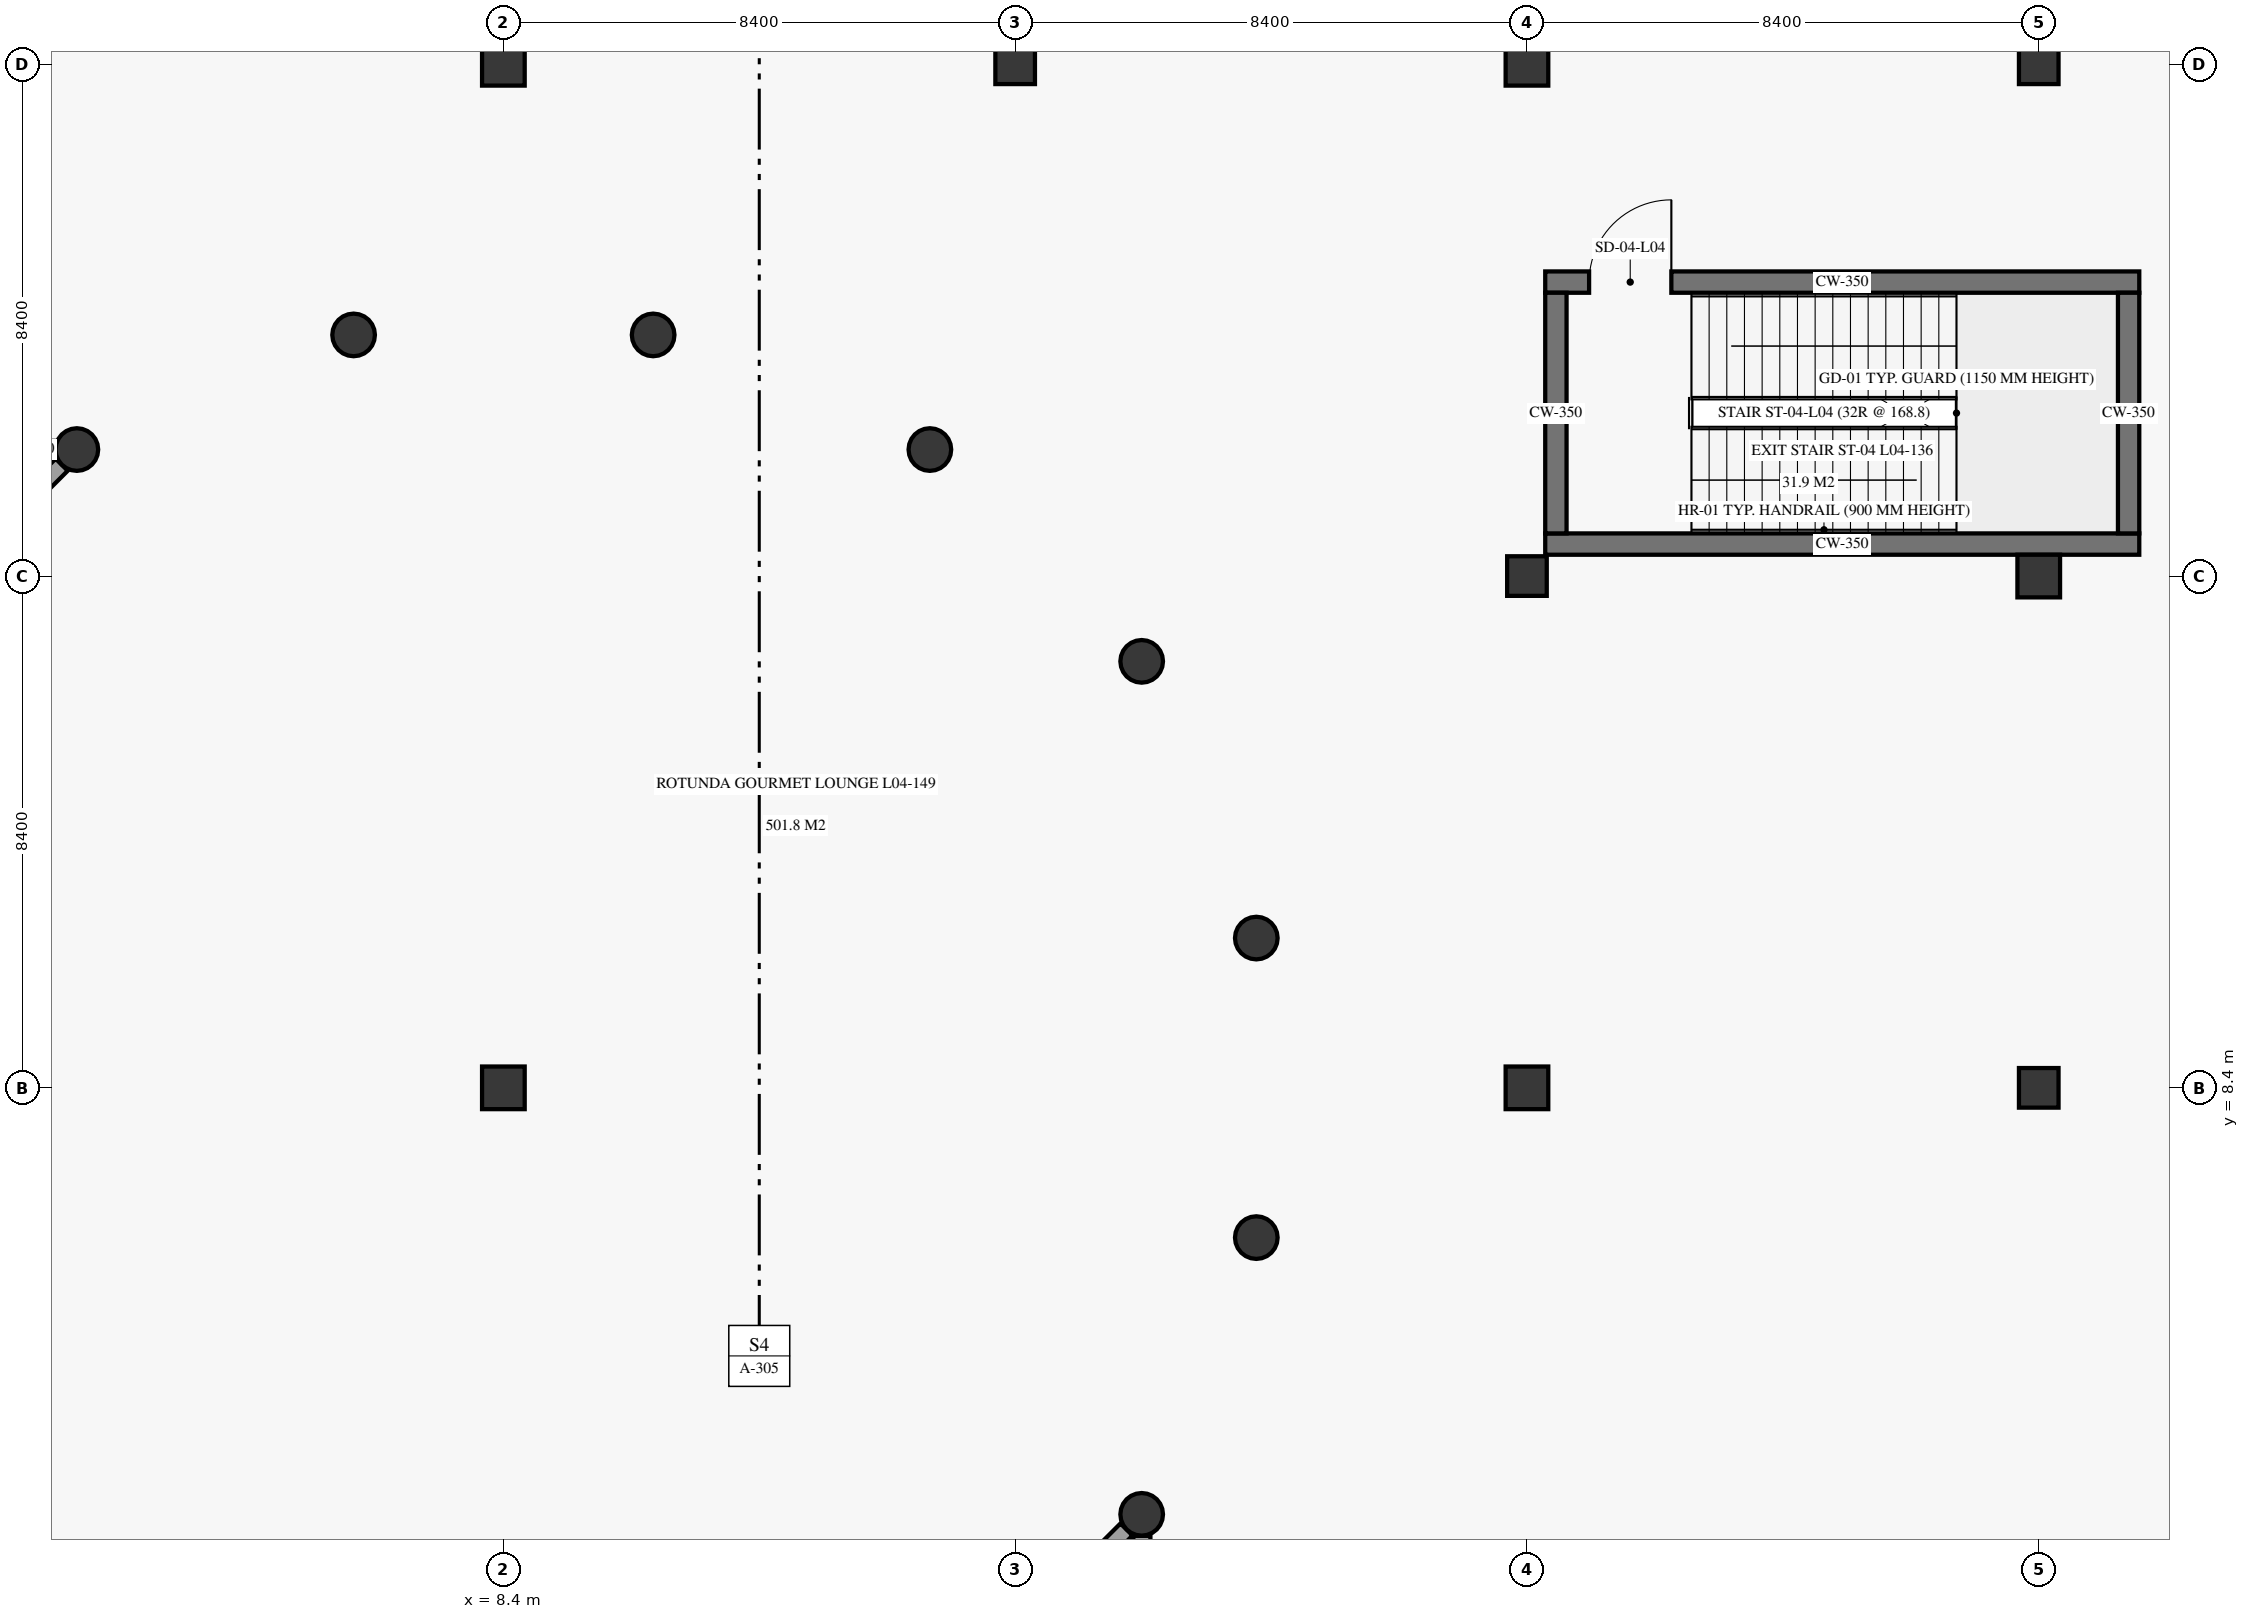
"""IFC4 building model, lengths in metres.
Left out: names, types, materials, properties, quantities, classifications, styles, units other than length and angle.
Written with IfcOpenShell. Run it as: python <this file> out.ifc"""

import sys

from ifc_helpers import new_model, si_unit, direction, frame, frame_2d, origin, origin_2d, place, context, subcontext, project, spatial, rectangle, circle, extrude, element, fill, save


model = new_model("IFC4")
c1 = context("Model", 3, precision=1e-05, world=origin(), true_north=direction((0.0, 1.0)))
c2 = subcontext(c1, "Body", "Model", "MODEL_VIEW")
j1 = project(units=[si_unit("LENGTHUNIT", "METRE"), si_unit("PLANEANGLEUNIT", "RADIAN")], contexts=[c1])
p1 = place(None, origin())
s1 = spatial("IfcSite", under=j1, at=p1, CompositionType="ELEMENT")
p2 = place(p1, origin())
s2 = spatial("IfcBuilding", under=s1, at=p2, CompositionType="ELEMENT")
p3 = place(p2, frame((0.0, 0.0, 16.8)))
s3 = spatial("IfcBuildingStorey", under=s2, at=p3, CompositionType="ELEMENT", Elevation=16.8)
for number, where, z_axis, x_axis in (
    (1, (8.4, 8.4, 0.0), (0.0, 0.0, 1.0), (1.0, 0.0, 0.0)),
    (2, (8.4, 25.2, 0.0), (0.0, 0.0, 1.0), (1.0, 0.0, 0.0)),
):
    element("IfcColumn", number, at=place(p3, frame(where, z_axis=z_axis, x_axis=x_axis)), inside=s3, PredefinedType="COLUMN", context=c2, shape_type="SweptSolid", body=[
        extrude(rectangle(XDim=0.7, YDim=0.7, at=origin_2d()), origin(), (0.0, 0.0, 1.0), 5.1),
    ])
p4 = place(p3, frame((16.8, 25.2, 0.0), z_axis=(0.0, 0.0, 1.0), x_axis=(1.0, 0.0, 0.0)))
e3 = element("IfcColumn", 3, at=p4, inside=s3, PredefinedType="COLUMN", context=c2, shape_type="SweptSolid", body=[
    extrude(rectangle(XDim=0.65, YDim=0.65, at=origin_2d()), origin(), (0.0, 0.0, 1.0), 5.1),
])
p5 = place(p3, frame((25.2, 8.4, 0.0), z_axis=(0.0, 0.0, 1.0), x_axis=(1.0, 0.0, 0.0)))
e4 = element("IfcColumn", 4, at=p5, inside=s3, PredefinedType="COLUMN", context=c2, shape_type="SweptSolid", body=[
    extrude(rectangle(XDim=0.7, YDim=0.7, at=origin_2d()), origin(), (0.0, 0.0, 1.0), 5.1),
])
p6 = place(p3, frame((25.2, 16.8, 0.0), z_axis=(0.0, 0.0, 1.0), x_axis=(1.0, 0.0, 0.0)))
e5 = element("IfcColumn", 5, at=p6, inside=s3, PredefinedType="COLUMN", context=c2, shape_type="SweptSolid", body=[
    extrude(rectangle(XDim=0.65, YDim=0.65, at=origin_2d()), origin(), (0.0, 0.0, 1.0), 5.1),
])
p7 = place(p3, frame((25.2, 25.2, 0.0), z_axis=(0.0, 0.0, 1.0), x_axis=(1.0, 0.0, 0.0)))
e6 = element("IfcColumn", 6, at=p7, inside=s3, PredefinedType="COLUMN", context=c2, shape_type="SweptSolid", body=[
    extrude(rectangle(XDim=0.7, YDim=0.7, at=origin_2d()), origin(), (0.0, 0.0, 1.0), 5.1),
])
p8 = place(p3, frame((33.6, 8.4, 0.0), z_axis=(0.0, 0.0, 1.0), x_axis=(1.0, 0.0, 0.0)))
e7 = element("IfcColumn", 7, at=p8, inside=s3, PredefinedType="COLUMN", context=c2, shape_type="SweptSolid", body=[
    extrude(rectangle(XDim=0.65, YDim=0.65, at=origin_2d()), origin(), (0.0, 0.0, 1.0), 5.1),
])
p9 = place(p3, frame((33.6, 16.8, 0.0), z_axis=(0.0, 0.0, 1.0), x_axis=(1.0, 0.0, 0.0)))
e8 = element("IfcColumn", 8, at=p9, inside=s3, PredefinedType="COLUMN", context=c2, shape_type="SweptSolid", body=[
    extrude(rectangle(XDim=0.7, YDim=0.7, at=origin_2d()), origin(), (0.0, 0.0, 1.0), 5.1),
])
p10 = place(p3, frame((33.6, 25.2, 0.0), z_axis=(0.0, 0.0, 1.0), x_axis=(1.0, 0.0, 0.0)))
e9 = element("IfcColumn", 9, at=p10, inside=s3, PredefinedType="COLUMN", context=c2, shape_type="SweptSolid", body=[
    extrude(rectangle(XDim=0.65, YDim=0.65, at=origin_2d()), origin(), (0.0, 0.0, 1.0), 5.1),
])
for number, where, z_axis, x_axis in (
    (10, (20.758, 10.858, 0.0), (0.0, 0.0, 1.0), (1.0, 0.0, 0.0)),
    (11, (18.876, 15.4, 0.0), (0.0, 0.0, 1.0), (1.0, 0.0, 0.0)),
    (12, (15.4, 18.876, 0.0), (0.0, 0.0, 1.0), (1.0, 0.0, 0.0)),
    (13, (10.858, 20.758, 0.0), (0.0, 0.0, 1.0), (1.0, 0.0, 0.0)),
    (14, (5.942, 20.758, 0.0), (0.0, 0.0, 1.0), (1.0, 0.0, 0.0)),
    (15, (1.4, 18.876, 0.0), (0.0, 0.0, 1.0), (1.0, 0.0, 0.0)),
    (16, (18.876, 1.4, 0.0), (0.0, 0.0, 1.0), (1.0, 0.0, 0.0)),
    (17, (20.758, 5.942, 0.0), (0.0, 0.0, 1.0), (1.0, 0.0, 0.0)),
):
    element("IfcColumn", number, at=place(p3, frame(where, z_axis=z_axis, x_axis=x_axis)), inside=s3, PredefinedType="COLUMN", context=c2, shape_type="SweptSolid", body=[
        extrude(circle(Radius=0.35, at=origin_2d()), origin(), (0.0, 0.0, 1.0), 5.1),
    ])
p11 = place(p3, frame((1.151, 18.628, 0.0), z_axis=(0.0, 0.0, 1.0), x_axis=(-0.707106781187, -0.707106781187, 0.0)))
e18 = element("IfcWall", 18, at=p11, inside=s3, PredefinedType="SOLIDWALL", context=c2, shape_type="SweptSolid", body=[
    extrude(rectangle(XDim=4.212, YDim=0.28, at=frame_2d((2.106, 0.0))), origin(), (0.0, 0.0, 1.0), 4.38),
])
p12 = place(p11, frame((1.018, 0.0, 1.05)))
e19 = element("IfcOpeningElement", 19, at=p12, cuts=e18, PredefinedType="OPENING", context=c2, shape_type="SweptSolid", body=[
    extrude(rectangle(XDim=1.95, YDim=1.85, at=frame_2d((0.975, 0.925))), frame((0.0, 0.15, 0.0), z_axis=(0.0, -1.0, 0.0), x_axis=(1.0, 0.0, 0.0)), (0.0, 0.0, 1.0), 0.3),
])
p13 = place(p3, frame((-1.828, 1.151, 0.0), z_axis=(0.0, 0.0, 1.0), x_axis=(0.707106781187, -0.707106781187, 0.0)))
e20 = element("IfcWall", 20, at=p13, inside=s3, PredefinedType="SOLIDWALL", context=c2, shape_type="SweptSolid", body=[
    extrude(rectangle(XDim=4.212, YDim=0.28, at=frame_2d((2.106, 0.0))), origin(), (0.0, 0.0, 1.0), 4.38),
])
p14 = place(p13, frame((1.018, 0.0, 1.05)))
e21 = element("IfcOpeningElement", 21, at=p14, cuts=e20, PredefinedType="OPENING", context=c2, shape_type="SweptSolid", body=[
    extrude(rectangle(XDim=1.95, YDim=1.85, at=frame_2d((0.975, 0.925))), frame((0.0, 0.15, 0.0), z_axis=(0.0, -1.0, 0.0), x_axis=(1.0, 0.0, 0.0)), (0.0, 0.0, 1.0), 0.3),
])
p15 = place(p3, frame((15.649, -1.828, 0.0), z_axis=(0.0, 0.0, 1.0), x_axis=(0.707106781187, 0.707106781187, 0.0)))
e22 = element("IfcWall", 22, at=p15, inside=s3, PredefinedType="SOLIDWALL", context=c2, shape_type="SweptSolid", body=[
    extrude(rectangle(XDim=4.212, YDim=0.28, at=frame_2d((2.106, 0.0))), origin(), (0.0, 0.0, 1.0), 4.38),
])
p16 = place(p15, frame((1.018, 0.0, 1.05)))
e23 = element("IfcOpeningElement", 23, at=p16, cuts=e22, PredefinedType="OPENING", context=c2, shape_type="SweptSolid", body=[
    extrude(rectangle(XDim=1.95, YDim=1.85, at=frame_2d((0.975, 0.925))), frame((0.0, 0.15, 0.0), z_axis=(0.0, -1.0, 0.0), x_axis=(1.0, 0.0, 0.0)), (0.0, 0.0, 1.0), 0.3),
])
for number, where, z_axis, x_axis in (
    (24, (0.15, 18.88, 0.0), (0.0, 0.0, 1.0), (1.0, 0.0, 0.0)),
    (25, (18.88, 0.15, 0.0), (0.0, 0.0, 1.0), (0.0, 1.0, 0.0)),
):
    element("IfcWall", number, at=place(p3, frame(where, z_axis=z_axis, x_axis=x_axis)), inside=s3, PredefinedType="SOLIDWALL", context=c2, shape_type="SweptSolid", body=[
        extrude(rectangle(XDim=0.896, YDim=0.28, at=frame_2d((0.448, 0.0))), origin(), (0.0, 0.0, 1.0), 4.38),
    ])
p17 = place(p3, frame((25.5, 17.325, 0.0), z_axis=(0.0, 0.0, 1.0), x_axis=(1.0, 0.0, 0.0)))
e26 = element("IfcWall", 26, at=p17, inside=s3, PredefinedType="SHEAR", context=c2, shape_type="SweptSolid", body=[
    extrude(rectangle(XDim=9.75, YDim=0.35, at=frame_2d((4.875, 0.0))), origin(), (0.0, 0.0, 1.0), 5.1),
])
p18 = place(p3, frame((25.5, 21.625, 0.0), z_axis=(0.0, 0.0, 1.0), x_axis=(1.0, 0.0, 0.0)))
e27 = element("IfcWall", 27, at=p18, inside=s3, PredefinedType="SHEAR", context=c2, shape_type="SweptSolid", body=[
    extrude(rectangle(XDim=9.75, YDim=0.35, at=frame_2d((4.875, 0.0))), origin(), (0.0, 0.0, 1.0), 5.1),
])
p19 = place(p18, frame((0.72, 0.0, 0.0)))
e28 = element("IfcOpeningElement", 28, at=p19, cuts=e27, PredefinedType="OPENING", context=c2, shape_type="SweptSolid", body=[
    extrude(rectangle(XDim=1.35, YDim=2.25, at=frame_2d((0.675, 1.125))), frame((0.0, 0.185, 0.0), z_axis=(0.0, -1.0, 0.0), x_axis=(1.0, 0.0, 0.0)), (0.0, 0.0, 1.0), 0.37),
])
for number, where, z_axis, x_axis in (
    (29, (25.675, 17.5, 0.0), (0.0, 0.0, 1.0), (0.0, 1.0, 0.0)),
    (30, (35.075, 17.5, 0.0), (0.0, 0.0, 1.0), (0.0, 1.0, 0.0)),
):
    element("IfcWall", number, at=place(p3, frame(where, z_axis=z_axis, x_axis=x_axis)), inside=s3, PredefinedType="SHEAR", context=c2, shape_type="SweptSolid", body=[
        extrude(rectangle(XDim=3.95, YDim=0.35, at=frame_2d((1.975, 0.0))), origin(), (0.0, 0.0, 1.0), 5.1),
    ])
p20 = place(p19, origin())
e31 = element("IfcDoor", 31, at=p20, inside=s3, OperationType="SINGLE_SWING_RIGHT", PredefinedType="DOOR", context=c2, shape_type="SweptSolid", body=[
    extrude(rectangle(XDim=1.35, YDim=2.25, at=frame_2d((0.675, 1.125))), frame((0.0, 0.025, 0.0), z_axis=(0.0, -1.0, 0.0), x_axis=(1.0, 0.0, 0.0)), (0.0, 0.0, 1.0), 0.05),
])
fill(e28, e31)
save(model, sys.argv[1])
